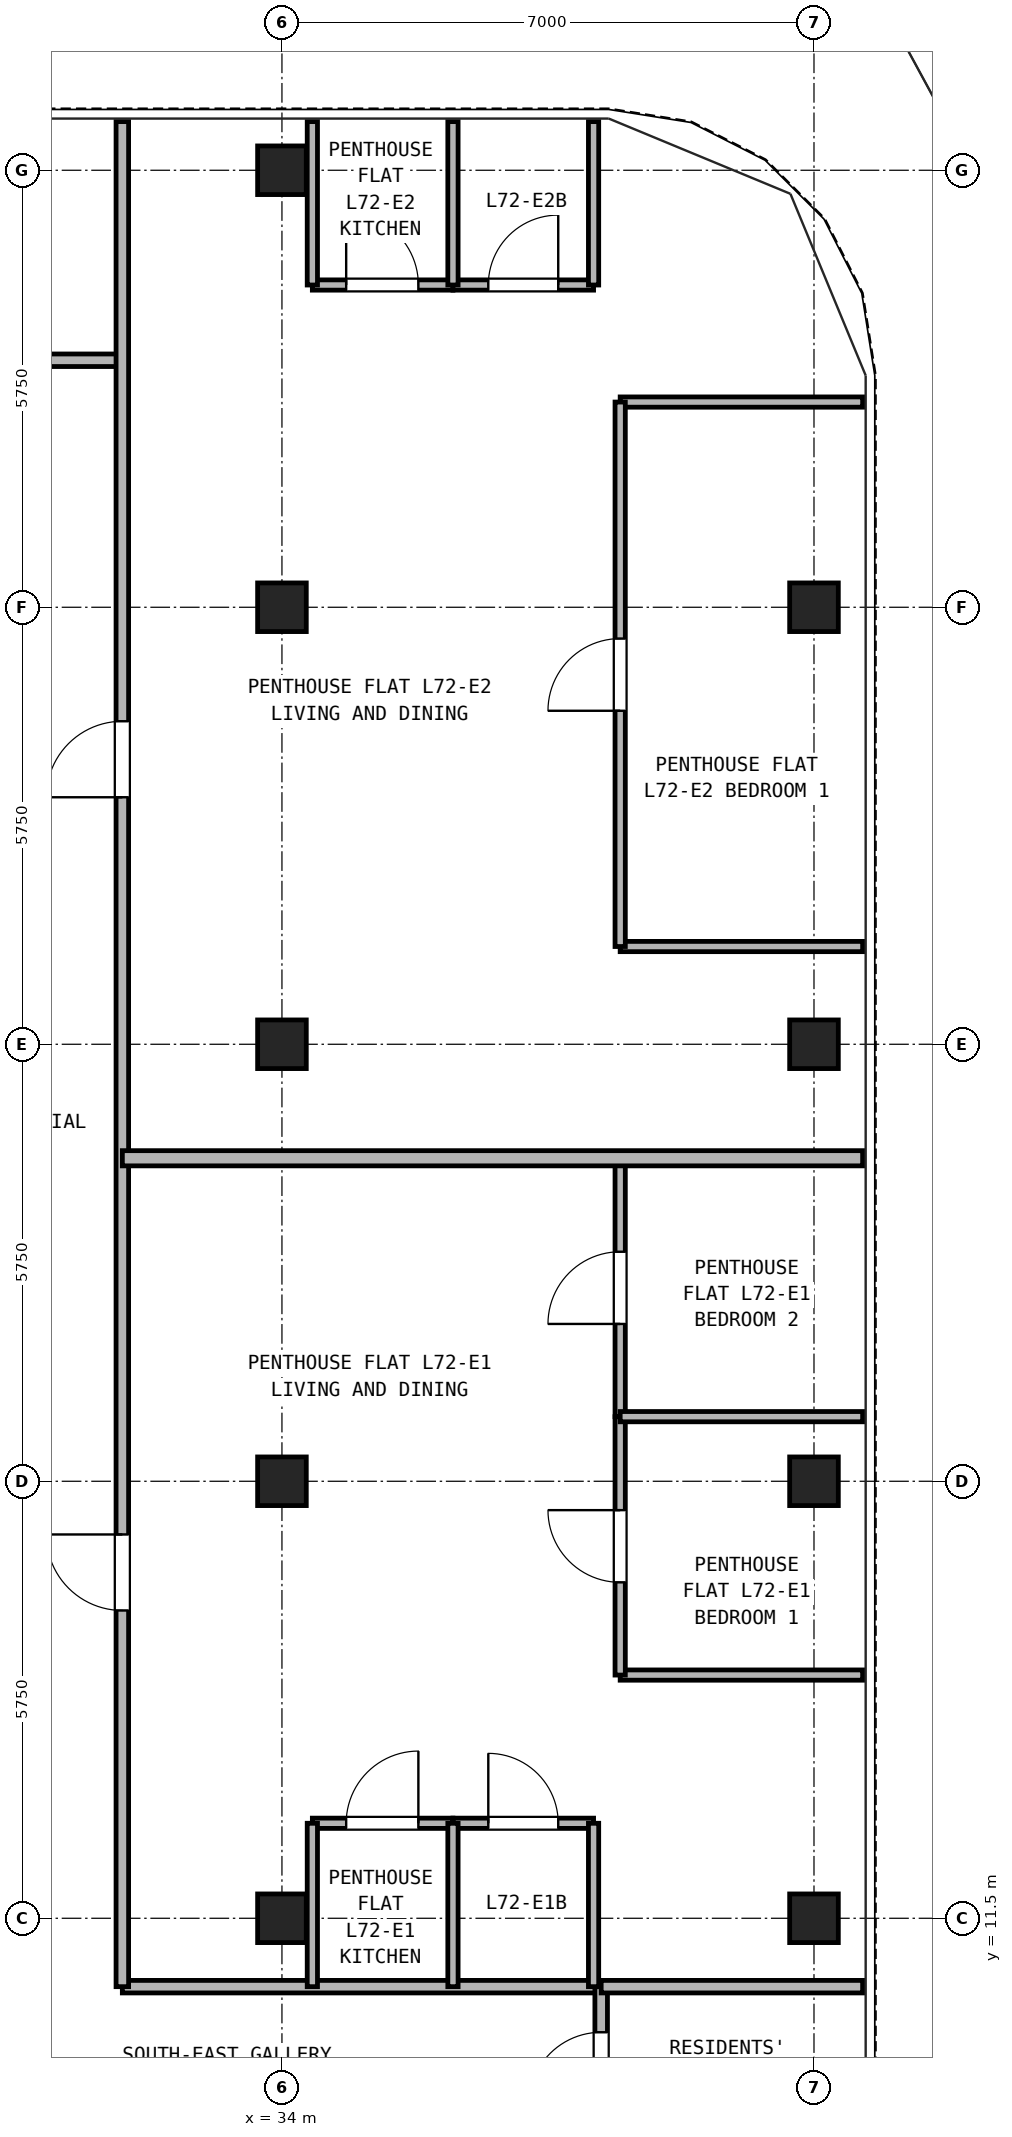
"""IFC4 building model, lengths in metres.
Left out: names, types, materials, properties, quantities, classifications, styles, units other than length and angle.
Written with IfcOpenShell. Run it as: python <this file> out.ifc"""

import sys

from ifc_helpers import new_model, si_unit, direction, frame, frame_2d, origin, origin_2d, place, context, subcontext, project, spatial, rectangle, hollow_rectangle, extrude, source, transform, mapped, element, fill, save


model = new_model("IFC4")
c1 = context("Model", 3, precision=1e-05, world=origin(), true_north=direction((0.0, 1.0)))
c2 = subcontext(c1, "Body", "Model", "MODEL_VIEW")
j1 = project(units=[si_unit("LENGTHUNIT", "METRE"), si_unit("PLANEANGLEUNIT", "RADIAN")], contexts=[c1])
p1 = place(None, origin())
s1 = spatial("IfcSite", under=j1, at=p1, CompositionType="ELEMENT")
p2 = place(p1, origin())
s2 = spatial("IfcBuilding", under=s1, at=p2, CompositionType="ELEMENT")
p3 = place(p2, frame((0.0, 0.0, 252.1)))
s3 = spatial("IfcBuildingStorey", under=s2, at=p3, CompositionType="ELEMENT", Elevation=252.1)
m1 = source(origin(), c2, "Body", "SweptSolid", [
    extrude(hollow_rectangle(XDim=0.64, YDim=0.64, WallThickness=0.035, at=origin_2d()), origin(), (0.0, 0.0, 1.0), 2.98),
])
for number, where, z_axis, x_axis in (
    (1, (34.0, 34.5, 0.0), (0.0, 0.0, 1.0), (1.0, 0.0, 0.0)),
    (2, (41.0, 11.5, 0.0), (0.0, 0.0, 1.0), (1.0, 0.0, 0.0)),
    (3, (41.0, 17.25, 0.0), (0.0, 0.0, 1.0), (1.0, 0.0, 0.0)),
    (4, (41.0, 23.0, 0.0), (0.0, 0.0, 1.0), (1.0, 0.0, 0.0)),
    (5, (41.0, 28.75, 0.0), (0.0, 0.0, 1.0), (1.0, 0.0, 0.0)),
    (6, (34.0, 11.5, 0.0), (0.0, 0.0, 1.0), (1.0, 0.0, 0.0)),
    (7, (34.0, 17.25, 0.0), (0.0, 0.0, 1.0), (1.0, 0.0, 0.0)),
    (8, (34.0, 23.0, 0.0), (0.0, 0.0, 1.0), (1.0, 0.0, 0.0)),
    (9, (34.0, 28.75, 0.0), (0.0, 0.0, 1.0), (1.0, 0.0, 0.0)),
):
    element("IfcColumn", number, at=place(p3, frame(where, z_axis=z_axis, x_axis=x_axis)), inside=s3, PredefinedType="COLUMN", context=c2, shape_type="MappedRepresentation", body=[
        mapped(m1, transform((0.0, 0.0, 0.0), x_axis=(1.0, 0.0, 0.0), y_axis=(0.0, 1.0, 0.0), z_axis=(0.0, 0.0, 1.0), scale=1.0)),
    ])
p4 = place(p3, frame((31.9, 10.6, 0.0), z_axis=(0.0, 0.0, 1.0), x_axis=(1.0, 0.0, 0.0)))
e10 = element("IfcWall", 10, at=p4, inside=s3, PredefinedType="PARTITIONING", context=c2, shape_type="SweptSolid", body=[
    extrude(rectangle(XDim=6.3, YDim=0.165, at=frame_2d((3.15, 0.0))), origin(), (0.0, 0.0, 1.0), 2.98),
])
p5 = place(p3, frame((38.2, 8.6, 0.0), z_axis=(0.0, 0.0, 1.0), x_axis=(0.0, 1.0, 0.0)))
e11 = element("IfcWall", 11, at=p5, inside=s3, PredefinedType="PARTITIONING", context=c2, shape_type="SweptSolid", body=[
    extrude(rectangle(XDim=2.0, YDim=0.165, at=frame_2d((1.0, 0.0))), origin(), (0.0, 0.0, 1.0), 2.98),
])
p6 = place(p5, frame((0.45, 0.0, 0.0)))
e12 = element("IfcOpeningElement", 12, at=p6, cuts=e11, PredefinedType="OPENING", context=c2, shape_type="SweptSolid", body=[
    extrude(rectangle(XDim=0.95, YDim=2.15, at=frame_2d((0.475, 1.075))), frame((0.0, 0.093, 0.0), z_axis=(0.0, -1.0, 0.0), x_axis=(1.0, 0.0, 0.0)), (0.0, 0.0, 1.0), 0.185),
])
p7 = place(p3, frame((15.1, 32.0, 0.0), z_axis=(0.0, 0.0, 1.0), x_axis=(1.0, 0.0, 0.0)))
e13 = element("IfcWall", 13, at=p7, inside=s3, PredefinedType="PARTITIONING", context=c2, shape_type="SweptSolid", body=[
    extrude(rectangle(XDim=16.8, YDim=0.165, at=frame_2d((8.4, 0.0))), origin(), (0.0, 0.0, 1.0), 2.98),
])
p8 = place(p7, frame((2.7, 0.0, 0.0)))
e14 = element("IfcOpeningElement", 14, at=p8, cuts=e13, PredefinedType="OPENING", context=c2, shape_type="SweptSolid", body=[
    extrude(rectangle(XDim=0.95, YDim=2.15, at=frame_2d((0.475, 1.075))), frame((0.0, 0.093, 0.0), z_axis=(0.0, -1.0, 0.0), x_axis=(1.0, 0.0, 0.0)), (0.0, 0.0, 1.0), 0.185),
])
p9 = place(p7, frame((8.1, 0.0, 0.0)))
e15 = element("IfcOpeningElement", 15, at=p9, cuts=e13, PredefinedType="OPENING", context=c2, shape_type="SweptSolid", body=[
    extrude(rectangle(XDim=0.95, YDim=2.15, at=frame_2d((0.475, 1.075))), frame((0.0, 0.093, 0.0), z_axis=(0.0, -1.0, 0.0), x_axis=(1.0, 0.0, 0.0)), (0.0, 0.0, 1.0), 0.185),
])
p10 = place(p7, frame((13.3, 0.0, 0.0)))
e16 = element("IfcOpeningElement", 16, at=p10, cuts=e13, PredefinedType="OPENING", context=c2, shape_type="SweptSolid", body=[
    extrude(rectangle(XDim=0.92, YDim=2.1, at=frame_2d((0.46, 1.05))), frame((0.0, 0.093, 0.0), z_axis=(0.0, -1.0, 0.0), x_axis=(1.0, 0.0, 0.0)), (0.0, 0.0, 1.0), 0.185),
])
p11 = place(p3, frame((31.9, 10.6, 0.0), z_axis=(0.0, 0.0, 1.0), x_axis=(0.0, 1.0, 0.0)))
e17 = element("IfcWall", 17, at=p11, inside=s3, PredefinedType="PARTITIONING", context=c2, shape_type="SweptSolid", body=[
    extrude(rectangle(XDim=24.54, YDim=0.165, at=frame_2d((12.27, 0.0))), origin(), (0.0, 0.0, 1.0), 2.98),
])
p12 = place(p11, frame((4.95, 0.0, 0.0)))
e18 = element("IfcOpeningElement", 18, at=p12, cuts=e17, PredefinedType="OPENING", context=c2, shape_type="SweptSolid", body=[
    extrude(rectangle(XDim=1.0, YDim=2.15, at=frame_2d((0.5, 1.075))), frame((0.0, 0.093, 0.0), z_axis=(0.0, -1.0, 0.0), x_axis=(1.0, 0.0, 0.0)), (0.0, 0.0, 1.0), 0.185),
])
p13 = place(p11, frame((15.65, 0.0, 0.0)))
e19 = element("IfcOpeningElement", 19, at=p13, cuts=e17, PredefinedType="OPENING", context=c2, shape_type="SweptSolid", body=[
    extrude(rectangle(XDim=1.0, YDim=2.15, at=frame_2d((0.5, 1.075))), frame((0.0, 0.093, 0.0), z_axis=(0.0, -1.0, 0.0), x_axis=(1.0, 0.0, 0.0)), (0.0, 0.0, 1.0), 0.185),
])
p14 = place(p3, frame((38.2, 10.6, 0.0), z_axis=(0.0, 0.0, 1.0), x_axis=(1.0, 0.0, 0.0)))
e20 = element("IfcWall", 20, at=p14, inside=s3, PredefinedType="PARTITIONING", context=c2, shape_type="SweptSolid", body=[
    extrude(rectangle(XDim=3.44, YDim=0.165, at=frame_2d((1.72, 0.0))), origin(), (0.0, 0.0, 1.0), 2.98),
])
p15 = place(p3, frame((34.4, 12.75, 0.0), z_axis=(0.0, 0.0, 1.0), x_axis=(1.0, 0.0, 0.0)))
e21 = element("IfcWall", 21, at=p15, inside=s3, PredefinedType="PARTITIONING", context=c2, shape_type="SweptSolid", body=[
    extrude(rectangle(XDim=1.85, YDim=0.135, at=frame_2d((0.925, 0.0))), origin(), (0.0, 0.0, 1.0), 2.98),
])
p16 = place(p15, frame((0.445, 0.0, 0.0)))
e22 = element("IfcOpeningElement", 22, at=p16, cuts=e21, PredefinedType="OPENING", context=c2, shape_type="SweptSolid", body=[
    extrude(rectangle(XDim=0.95, YDim=2.15, at=frame_2d((0.475, 1.075))), frame((0.0, 0.077, 0.0), z_axis=(0.0, -1.0, 0.0), x_axis=(1.0, 0.0, 0.0)), (0.0, 0.0, 1.0), 0.155),
])
p17 = place(p3, frame((36.25, 12.75, 0.0), z_axis=(0.0, 0.0, 1.0), x_axis=(1.0, 0.0, 0.0)))
e23 = element("IfcWall", 23, at=p17, inside=s3, PredefinedType="PARTITIONING", context=c2, shape_type="SweptSolid", body=[
    extrude(rectangle(XDim=1.85, YDim=0.135, at=frame_2d((0.925, 0.0))), origin(), (0.0, 0.0, 1.0), 2.98),
])
p18 = place(p17, frame((0.465, 0.0, 0.0)))
e24 = element("IfcOpeningElement", 24, at=p18, cuts=e23, PredefinedType="OPENING", context=c2, shape_type="SweptSolid", body=[
    extrude(rectangle(XDim=0.92, YDim=2.1, at=frame_2d((0.46, 1.05))), frame((0.0, 0.077, 0.0), z_axis=(0.0, -1.0, 0.0), x_axis=(1.0, 0.0, 0.0)), (0.0, 0.0, 1.0), 0.155),
])
for number, where, z_axis, x_axis in (
    (25, (34.4, 10.6, 0.0), (0.0, 0.0, 1.0), (0.0, 1.0, 0.0)),
    (26, (36.25, 10.6, 0.0), (0.0, 0.0, 1.0), (0.0, 1.0, 0.0)),
    (27, (38.1, 10.6, 0.0), (0.0, 0.0, 1.0), (0.0, 1.0, 0.0)),
):
    element("IfcWall", number, at=place(p3, frame(where, z_axis=z_axis, x_axis=x_axis)), inside=s3, PredefinedType="PARTITIONING", context=c2, shape_type="SweptSolid", body=[
        extrude(rectangle(XDim=2.15, YDim=0.135, at=frame_2d((1.075, 0.0))), origin(), (0.0, 0.0, 1.0), 2.98),
    ])
p19 = place(p3, frame((38.45, 14.7, 0.0), z_axis=(0.0, 0.0, 1.0), x_axis=(1.0, 0.0, 0.0)))
e28 = element("IfcWall", 28, at=p19, inside=s3, PredefinedType="PARTITIONING", context=c2, shape_type="SweptSolid", body=[
    extrude(rectangle(XDim=3.19, YDim=0.135, at=frame_2d((1.595, 0.0))), origin(), (0.0, 0.0, 1.0), 2.98),
])
p20 = place(p3, frame((38.45, 14.7, 0.0), z_axis=(0.0, 0.0, 1.0), x_axis=(0.0, 1.0, 0.0)))
e29 = element("IfcWall", 29, at=p20, inside=s3, PredefinedType="PARTITIONING", context=c2, shape_type="SweptSolid", body=[
    extrude(rectangle(XDim=3.4, YDim=0.135, at=frame_2d((1.7, 0.0))), origin(), (0.0, 0.0, 1.0), 2.98),
])
p21 = place(p20, frame((1.22, 0.0, 0.0)))
e30 = element("IfcOpeningElement", 30, at=p21, cuts=e29, PredefinedType="OPENING", context=c2, shape_type="SweptSolid", body=[
    extrude(rectangle(XDim=0.95, YDim=2.15, at=frame_2d((0.475, 1.075))), frame((0.0, 0.077, 0.0), z_axis=(0.0, -1.0, 0.0), x_axis=(1.0, 0.0, 0.0)), (0.0, 0.0, 1.0), 0.155),
])
p22 = place(p3, frame((38.45, 18.1, 0.0), z_axis=(0.0, 0.0, 1.0), x_axis=(0.0, 1.0, 0.0)))
e31 = element("IfcWall", 31, at=p22, inside=s3, PredefinedType="PARTITIONING", context=c2, shape_type="SweptSolid", body=[
    extrude(rectangle(XDim=3.4, YDim=0.135, at=frame_2d((1.7, 0.0))), origin(), (0.0, 0.0, 1.0), 2.98),
])
p23 = place(p22, frame((1.22, 0.0, 0.0)))
e32 = element("IfcOpeningElement", 32, at=p23, cuts=e31, PredefinedType="OPENING", context=c2, shape_type="SweptSolid", body=[
    extrude(rectangle(XDim=0.95, YDim=2.15, at=frame_2d((0.475, 1.075))), frame((0.0, 0.077, 0.0), z_axis=(0.0, -1.0, 0.0), x_axis=(1.0, 0.0, 0.0)), (0.0, 0.0, 1.0), 0.155),
])
p24 = place(p3, frame((38.45, 18.1, 0.0), z_axis=(0.0, 0.0, 1.0), x_axis=(1.0, 0.0, 0.0)))
e33 = element("IfcWall", 33, at=p24, inside=s3, PredefinedType="PARTITIONING", context=c2, shape_type="SweptSolid", body=[
    extrude(rectangle(XDim=3.19, YDim=0.135, at=frame_2d((1.595, 0.0))), origin(), (0.0, 0.0, 1.0), 2.98),
])
p25 = place(p3, frame((31.9, 21.5, 0.0), z_axis=(0.0, 0.0, 1.0), x_axis=(1.0, 0.0, 0.0)))
e34 = element("IfcWall", 34, at=p25, inside=s3, PredefinedType="PARTITIONING", context=c2, shape_type="SweptSolid", body=[
    extrude(rectangle(XDim=9.74, YDim=0.2, at=frame_2d((4.87, 0.0))), origin(), (0.0, 0.0, 1.0), 2.98),
])
p26 = place(p3, frame((34.4, 32.99, 0.0), z_axis=(0.0, 0.0, 1.0), x_axis=(1.0, 0.0, 0.0)))
e35 = element("IfcWall", 35, at=p26, inside=s3, PredefinedType="PARTITIONING", context=c2, shape_type="SweptSolid", body=[
    extrude(rectangle(XDim=1.85, YDim=0.135, at=frame_2d((0.925, 0.0))), origin(), (0.0, 0.0, 1.0), 2.98),
])
p27 = place(p26, frame((0.445, 0.0, 0.0)))
e36 = element("IfcOpeningElement", 36, at=p27, cuts=e35, PredefinedType="OPENING", context=c2, shape_type="SweptSolid", body=[
    extrude(rectangle(XDim=0.95, YDim=2.15, at=frame_2d((0.475, 1.075))), frame((0.0, 0.077, 0.0), z_axis=(0.0, -1.0, 0.0), x_axis=(1.0, 0.0, 0.0)), (0.0, 0.0, 1.0), 0.155),
])
p28 = place(p3, frame((36.25, 32.99, 0.0), z_axis=(0.0, 0.0, 1.0), x_axis=(1.0, 0.0, 0.0)))
e37 = element("IfcWall", 37, at=p28, inside=s3, PredefinedType="PARTITIONING", context=c2, shape_type="SweptSolid", body=[
    extrude(rectangle(XDim=1.85, YDim=0.135, at=frame_2d((0.925, 0.0))), origin(), (0.0, 0.0, 1.0), 2.98),
])
p29 = place(p28, frame((0.465, 0.0, 0.0)))
e38 = element("IfcOpeningElement", 38, at=p29, cuts=e37, PredefinedType="OPENING", context=c2, shape_type="SweptSolid", body=[
    extrude(rectangle(XDim=0.92, YDim=2.1, at=frame_2d((0.46, 1.05))), frame((0.0, 0.077, 0.0), z_axis=(0.0, -1.0, 0.0), x_axis=(1.0, 0.0, 0.0)), (0.0, 0.0, 1.0), 0.155),
])
for number, where, z_axis, x_axis in (
    (39, (34.4, 32.99, 0.0), (0.0, 0.0, 1.0), (0.0, 1.0, 0.0)),
    (40, (36.25, 32.99, 0.0), (0.0, 0.0, 1.0), (0.0, 1.0, 0.0)),
    (41, (38.1, 32.99, 0.0), (0.0, 0.0, 1.0), (0.0, 1.0, 0.0)),
):
    element("IfcWall", number, at=place(p3, frame(where, z_axis=z_axis, x_axis=x_axis)), inside=s3, PredefinedType="PARTITIONING", context=c2, shape_type="SweptSolid", body=[
        extrude(rectangle(XDim=2.15, YDim=0.135, at=frame_2d((1.075, 0.0))), origin(), (0.0, 0.0, 1.0), 2.98),
    ])
for number, where, z_axis, x_axis in (
    (42, (38.45, 24.286, 0.0), (0.0, 0.0, 1.0), (1.0, 0.0, 0.0)),
    (43, (38.45, 31.45, 0.0), (0.0, 0.0, 1.0), (1.0, 0.0, 0.0)),
):
    element("IfcWall", number, at=place(p3, frame(where, z_axis=z_axis, x_axis=x_axis)), inside=s3, PredefinedType="PARTITIONING", context=c2, shape_type="SweptSolid", body=[
        extrude(rectangle(XDim=3.19, YDim=0.135, at=frame_2d((1.595, 0.0))), origin(), (0.0, 0.0, 1.0), 2.98),
    ])
p30 = place(p3, frame((38.45, 24.286, 0.0), z_axis=(0.0, 0.0, 1.0), x_axis=(0.0, 1.0, 0.0)))
e44 = element("IfcWall", 44, at=p30, inside=s3, PredefinedType="PARTITIONING", context=c2, shape_type="SweptSolid", body=[
    extrude(rectangle(XDim=7.164, YDim=0.135, at=frame_2d((3.582, 0.0))), origin(), (0.0, 0.0, 1.0), 2.98),
])
p31 = place(p30, frame((3.102, 0.0, 0.0)))
e45 = element("IfcOpeningElement", 45, at=p31, cuts=e44, PredefinedType="OPENING", context=c2, shape_type="SweptSolid", body=[
    extrude(rectangle(XDim=0.95, YDim=2.15, at=frame_2d((0.475, 1.075))), frame((0.0, 0.077, 0.0), z_axis=(0.0, -1.0, 0.0), x_axis=(1.0, 0.0, 0.0)), (0.0, 0.0, 1.0), 0.155),
])
p32 = place(p6, origin())
e46 = element("IfcDoor", 46, at=p32, inside=s3, OperationType="SINGLE_SWING_LEFT", PredefinedType="DOOR", context=c2, shape_type="SweptSolid", body=[
    extrude(rectangle(XDim=0.95, YDim=2.15, at=frame_2d((0.475, 1.075))), frame((0.0, 0.025, 0.0), z_axis=(0.0, -1.0, 0.0), x_axis=(1.0, 0.0, 0.0)), (0.0, 0.0, 1.0), 0.05),
])
fill(e12, e46)
p33 = place(p16, origin())
e47 = element("IfcDoor", 47, at=p33, inside=s3, OperationType="SINGLE_SWING_RIGHT", PredefinedType="DOOR", context=c2, shape_type="SweptSolid", body=[
    extrude(rectangle(XDim=0.95, YDim=2.15, at=frame_2d((0.475, 1.075))), frame((0.0, 0.025, 0.0), z_axis=(0.0, -1.0, 0.0), x_axis=(1.0, 0.0, 0.0)), (0.0, 0.0, 1.0), 0.05),
])
fill(e22, e47)
p34 = place(p18, origin())
e48 = element("IfcDoor", 48, at=p34, inside=s3, OperationType="SINGLE_SWING_LEFT", PredefinedType="DOOR", context=c2, shape_type="SweptSolid", body=[
    extrude(rectangle(XDim=0.92, YDim=2.1, at=frame_2d((0.46, 1.05))), frame((0.0, 0.025, 0.0), z_axis=(0.0, -1.0, 0.0), x_axis=(1.0, 0.0, 0.0)), (0.0, 0.0, 1.0), 0.05),
])
fill(e24, e48)
p35 = place(p21, frame((0.95, 0.0, 0.0), z_axis=(0.0, 0.0, 1.0), x_axis=(-1.0, 0.0, 0.0)))
e49 = element("IfcDoor", 49, at=p35, inside=s3, OperationType="SINGLE_SWING_RIGHT", PredefinedType="DOOR", context=c2, shape_type="SweptSolid", body=[
    extrude(rectangle(XDim=0.95, YDim=2.15, at=frame_2d((0.475, 1.075))), frame((0.0, 0.025, 0.0), z_axis=(0.0, -1.0, 0.0), x_axis=(1.0, 0.0, 0.0)), (0.0, 0.0, 1.0), 0.05),
])
fill(e30, e49)
p36 = place(p23, frame((0.95, 0.0, 0.0), z_axis=(0.0, 0.0, 1.0), x_axis=(-1.0, 0.0, 0.0)))
e50 = element("IfcDoor", 50, at=p36, inside=s3, OperationType="SINGLE_SWING_LEFT", PredefinedType="DOOR", context=c2, shape_type="SweptSolid", body=[
    extrude(rectangle(XDim=0.95, YDim=2.15, at=frame_2d((0.475, 1.075))), frame((0.0, 0.025, 0.0), z_axis=(0.0, -1.0, 0.0), x_axis=(1.0, 0.0, 0.0)), (0.0, 0.0, 1.0), 0.05),
])
fill(e32, e50)
p37 = place(p12, frame((1.0, 0.0, 0.0), z_axis=(0.0, 0.0, 1.0), x_axis=(-1.0, 0.0, 0.0)))
e51 = element("IfcDoor", 51, at=p37, inside=s3, OperationType="SINGLE_SWING_RIGHT", PredefinedType="DOOR", context=c2, shape_type="SweptSolid", body=[
    extrude(rectangle(XDim=1.0, YDim=2.15, at=frame_2d((0.5, 1.075))), frame((0.0, 0.025, 0.0), z_axis=(0.0, -1.0, 0.0), x_axis=(1.0, 0.0, 0.0)), (0.0, 0.0, 1.0), 0.05),
])
fill(e18, e51)
p38 = place(p27, frame((0.95, 0.0, 0.0), z_axis=(0.0, 0.0, 1.0), x_axis=(-1.0, 0.0, 0.0)))
e52 = element("IfcDoor", 52, at=p38, inside=s3, OperationType="SINGLE_SWING_LEFT", PredefinedType="DOOR", context=c2, shape_type="SweptSolid", body=[
    extrude(rectangle(XDim=0.95, YDim=2.15, at=frame_2d((0.475, 1.075))), frame((0.0, 0.025, 0.0), z_axis=(0.0, -1.0, 0.0), x_axis=(1.0, 0.0, 0.0)), (0.0, 0.0, 1.0), 0.05),
])
fill(e36, e52)
p39 = place(p29, frame((0.92, 0.0, 0.0), z_axis=(0.0, 0.0, 1.0), x_axis=(-1.0, 0.0, 0.0)))
e53 = element("IfcDoor", 53, at=p39, inside=s3, OperationType="SINGLE_SWING_RIGHT", PredefinedType="DOOR", context=c2, shape_type="SweptSolid", body=[
    extrude(rectangle(XDim=0.92, YDim=2.1, at=frame_2d((0.46, 1.05))), frame((0.0, 0.025, 0.0), z_axis=(0.0, -1.0, 0.0), x_axis=(1.0, 0.0, 0.0)), (0.0, 0.0, 1.0), 0.05),
])
fill(e38, e53)
p40 = place(p31, frame((0.95, 0.0, 0.0), z_axis=(0.0, 0.0, 1.0), x_axis=(-1.0, 0.0, 0.0)))
e54 = element("IfcDoor", 54, at=p40, inside=s3, OperationType="SINGLE_SWING_LEFT", PredefinedType="DOOR", context=c2, shape_type="SweptSolid", body=[
    extrude(rectangle(XDim=0.95, YDim=2.15, at=frame_2d((0.475, 1.075))), frame((0.0, 0.025, 0.0), z_axis=(0.0, -1.0, 0.0), x_axis=(1.0, 0.0, 0.0)), (0.0, 0.0, 1.0), 0.05),
])
fill(e45, e54)
p41 = place(p13, frame((1.0, 0.0, 0.0), z_axis=(0.0, 0.0, 1.0), x_axis=(-1.0, 0.0, 0.0)))
e55 = element("IfcDoor", 55, at=p41, inside=s3, OperationType="SINGLE_SWING_LEFT", PredefinedType="DOOR", context=c2, shape_type="SweptSolid", body=[
    extrude(rectangle(XDim=1.0, YDim=2.15, at=frame_2d((0.5, 1.075))), frame((0.0, 0.025, 0.0), z_axis=(0.0, -1.0, 0.0), x_axis=(1.0, 0.0, 0.0)), (0.0, 0.0, 1.0), 0.05),
])
fill(e19, e55)
save(model, sys.argv[1])
